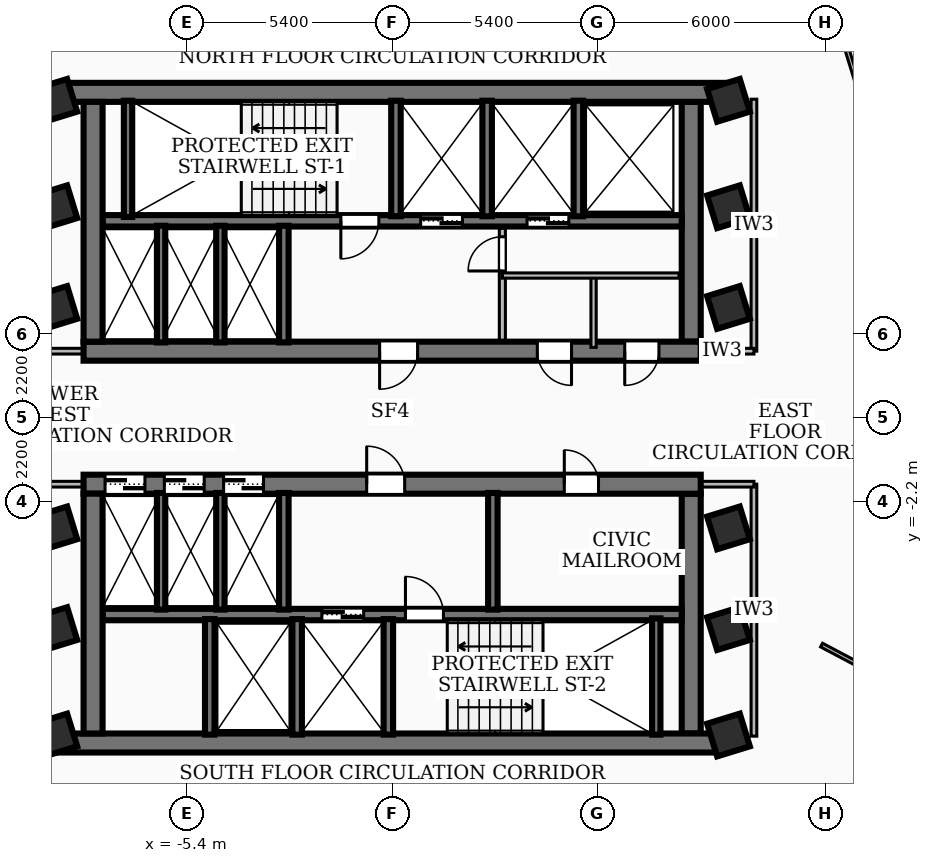
"""IFC4 building model, lengths in metres.
Left out: names, types, materials, properties, quantities, classifications, styles, units other than length and angle.
Written with IfcOpenShell. Run it as: python <this file> out.ifc"""

import sys

from ifc_helpers import new_model, si_unit, direction, frame, frame_2d, origin, origin_2d, place, context, subcontext, project, spatial, rectangle, extrude, element, fill, save


model = new_model("IFC4")
c1 = context("Model", 3, precision=1e-05, world=origin(), true_north=direction((0.0, 1.0)))
c2 = subcontext(c1, "Body", "Model", "MODEL_VIEW")
j1 = project(units=[si_unit("LENGTHUNIT", "METRE"), si_unit("PLANEANGLEUNIT", "RADIAN")], contexts=[c1])
p1 = place(None, origin())
s1 = spatial("IfcSite", under=j1, at=p1, CompositionType="ELEMENT")
p2 = place(p1, origin())
s2 = spatial("IfcBuilding", under=s1, at=p2, CompositionType="ELEMENT")
p3 = place(p2, frame((0.0, 0.0, 148.68)))
s3 = spatial("IfcBuildingStorey", under=s2, at=p3, CompositionType="ELEMENT", Elevation=148.68)
p4 = place(p3, frame((-8.78, 8.56, 0.0), z_axis=(0.0, 0.0, 1.0), x_axis=(1.0, 0.0, 0.0)))
e1 = element("IfcWall", 1, at=p4, inside=s3, PredefinedType="SHEAR", context=c2, shape_type="SweptSolid", body=[
    extrude(rectangle(XDim=17.56, YDim=0.5, at=frame_2d((8.78, 0.0))), origin(), (0.0, 0.0, 1.0), 3.32),
])
p5 = place(p3, frame((8.12, 1.75, 0.0), z_axis=(0.0, 0.0, 1.0), x_axis=(-1.0, 0.0, 0.0)))
e2 = element("IfcWall", 2, at=p5, inside=s3, PredefinedType="SHEAR", context=c2, shape_type="SweptSolid", body=[
    extrude(rectangle(XDim=16.24, YDim=0.5, at=frame_2d((8.12, 0.0))), origin(), (0.0, 0.0, 1.0), 3.32),
])
p6 = place(p5, frame((7.45, 0.0, 0.0)))
e3 = element("IfcOpeningElement", 3, at=p6, cuts=e2, PredefinedType="OPENING", context=c2, shape_type="SweptSolid", body=[
    extrude(rectangle(XDim=1.0, YDim=2.1, at=frame_2d((0.5, 1.05))), frame((0.0, 0.26, 0.0), z_axis=(0.0, -1.0, 0.0), x_axis=(1.0, 0.0, 0.0)), (0.0, 0.0, 1.0), 0.52),
])
p7 = place(p5, frame((3.4, 0.0, 0.0)))
e4 = element("IfcOpeningElement", 4, at=p7, cuts=e2, PredefinedType="OPENING", context=c2, shape_type="SweptSolid", body=[
    extrude(rectangle(XDim=0.9, YDim=2.06, at=frame_2d((0.45, 1.03))), frame((0.0, 0.26, 0.0), z_axis=(0.0, -1.0, 0.0), x_axis=(1.0, 0.0, 0.0)), (0.0, 0.0, 1.0), 0.52),
])
p8 = place(p5, frame((1.1, 0.0, 0.0)))
e5 = element("IfcOpeningElement", 5, at=p8, cuts=e2, PredefinedType="OPENING", context=c2, shape_type="SweptSolid", body=[
    extrude(rectangle(XDim=0.9, YDim=2.06, at=frame_2d((0.45, 1.03))), frame((0.0, 0.26, 0.0), z_axis=(0.0, -1.0, 0.0), x_axis=(1.0, 0.0, 0.0)), (0.0, 0.0, 1.0), 0.52),
])
for number, where, z_axis, x_axis in (
    (6, (-7.87, 2.0, 0.0), (0.0, 0.0, 1.0), (0.0, 1.0, 0.0)),
    (7, (7.87, 8.31, 0.0), (0.0, 0.0, 1.0), (0.0, -1.0, 0.0)),
):
    element("IfcWall", number, at=place(p3, frame(where, z_axis=z_axis, x_axis=x_axis)), inside=s3, PredefinedType="SHEAR", context=c2, shape_type="SweptSolid", body=[
        extrude(rectangle(XDim=6.31, YDim=0.5, at=frame_2d((3.155, 0.0))), origin(), (0.0, 0.0, 1.0), 3.32),
    ])
p9 = place(p3, frame((7.62, 5.18, 0.0), z_axis=(0.0, 0.0, 1.0), x_axis=(-1.0, 0.0, 0.0)))
e8 = element("IfcWall", 8, at=p9, inside=s3, PredefinedType="SOLIDWALL", context=c2, shape_type="SweptSolid", body=[
    extrude(rectangle(XDim=15.24, YDim=0.3, at=frame_2d((7.62, 0.0))), origin(), (0.0, 0.0, 1.0), 3.32),
])
p10 = place(p9, frame((5.77, 0.0, 0.0)))
e9 = element("IfcOpeningElement", 9, at=p10, cuts=e8, PredefinedType="OPENING", context=c2, shape_type="SweptSolid", body=[
    extrude(rectangle(XDim=1.1, YDim=2.15, at=frame_2d((0.55, 1.075))), frame((0.0, 0.16, 0.0), z_axis=(0.0, -1.0, 0.0), x_axis=(1.0, 0.0, 0.0)), (0.0, 0.0, 1.0), 0.32),
])
p11 = place(p9, frame((2.97, 0.0, 0.0)))
e10 = element("IfcOpeningElement", 10, at=p11, cuts=e8, PredefinedType="OPENING", context=c2, shape_type="SweptSolid", body=[
    extrude(rectangle(XDim=1.1, YDim=2.15, at=frame_2d((0.55, 1.075))), frame((0.0, 0.16, 0.0), z_axis=(0.0, -1.0, 0.0), x_axis=(1.0, 0.0, 0.0)), (0.0, 0.0, 1.0), 0.32),
])
p12 = place(p9, frame((7.97, 0.0, 0.0)))
e11 = element("IfcOpeningElement", 11, at=p12, cuts=e8, PredefinedType="OPENING", context=c2, shape_type="SweptSolid", body=[
    extrude(rectangle(XDim=1.0, YDim=2.1, at=frame_2d((0.5, 1.05))), frame((0.0, 0.16, 0.0), z_axis=(0.0, -1.0, 0.0), x_axis=(1.0, 0.0, 0.0)), (0.0, 0.0, 1.0), 0.32),
])
p13 = place(p3, frame((8.78, -8.56, 0.0), z_axis=(0.0, 0.0, 1.0), x_axis=(-1.0, 0.0, 0.0)))
e12 = element("IfcWall", 12, at=p13, inside=s3, PredefinedType="SHEAR", context=c2, shape_type="SweptSolid", body=[
    extrude(rectangle(XDim=17.56, YDim=0.5, at=frame_2d((8.78, 0.0))), origin(), (0.0, 0.0, 1.0), 3.32),
])
p14 = place(p3, frame((-8.12, -1.75, 0.0), z_axis=(0.0, 0.0, 1.0), x_axis=(1.0, 0.0, 0.0)))
e13 = element("IfcWall", 13, at=p14, inside=s3, PredefinedType="SHEAR", context=c2, shape_type="SweptSolid", body=[
    extrude(rectangle(XDim=16.24, YDim=0.5, at=frame_2d((8.12, 0.0))), origin(), (0.0, 0.0, 1.0), 3.32),
])
p15 = place(p14, frame((7.45, 0.0, 0.0)))
e14 = element("IfcOpeningElement", 14, at=p15, cuts=e13, PredefinedType="OPENING", context=c2, shape_type="SweptSolid", body=[
    extrude(rectangle(XDim=1.0, YDim=2.1, at=frame_2d((0.5, 1.05))), frame((0.0, 0.26, 0.0), z_axis=(0.0, -1.0, 0.0), x_axis=(1.0, 0.0, 0.0)), (0.0, 0.0, 1.0), 0.52),
])
p16 = place(p14, frame((12.65, 0.0, 0.0)))
e15 = element("IfcOpeningElement", 15, at=p16, cuts=e13, PredefinedType="OPENING", context=c2, shape_type="SweptSolid", body=[
    extrude(rectangle(XDim=0.9, YDim=2.06, at=frame_2d((0.45, 1.03))), frame((0.0, 0.26, 0.0), z_axis=(0.0, -1.0, 0.0), x_axis=(1.0, 0.0, 0.0)), (0.0, 0.0, 1.0), 0.52),
])
p17 = place(p14, frame((0.565, 0.0, 0.0)))
e16 = element("IfcOpeningElement", 16, at=p17, cuts=e13, PredefinedType="OPENING", context=c2, shape_type="SweptSolid", body=[
    extrude(rectangle(XDim=1.05, YDim=2.15, at=frame_2d((0.525, 1.075))), frame((0.0, 0.26, 0.0), z_axis=(0.0, -1.0, 0.0), x_axis=(1.0, 0.0, 0.0)), (0.0, 0.0, 1.0), 0.52),
])
p18 = place(p14, frame((2.125, 0.0, 0.0)))
e17 = element("IfcOpeningElement", 17, at=p18, cuts=e13, PredefinedType="OPENING", context=c2, shape_type="SweptSolid", body=[
    extrude(rectangle(XDim=1.05, YDim=2.15, at=frame_2d((0.525, 1.075))), frame((0.0, 0.26, 0.0), z_axis=(0.0, -1.0, 0.0), x_axis=(1.0, 0.0, 0.0)), (0.0, 0.0, 1.0), 0.52),
])
p19 = place(p14, frame((3.685, 0.0, 0.0)))
e18 = element("IfcOpeningElement", 18, at=p19, cuts=e13, PredefinedType="OPENING", context=c2, shape_type="SweptSolid", body=[
    extrude(rectangle(XDim=1.05, YDim=2.15, at=frame_2d((0.525, 1.075))), frame((0.0, 0.26, 0.0), z_axis=(0.0, -1.0, 0.0), x_axis=(1.0, 0.0, 0.0)), (0.0, 0.0, 1.0), 0.52),
])
for number, where, z_axis, x_axis in (
    (19, (-7.87, -8.31, 0.0), (0.0, 0.0, 1.0), (0.0, 1.0, 0.0)),
    (20, (7.87, -2.0, 0.0), (0.0, 0.0, 1.0), (0.0, -1.0, 0.0)),
):
    element("IfcWall", number, at=place(p3, frame(where, z_axis=z_axis, x_axis=x_axis)), inside=s3, PredefinedType="SHEAR", context=c2, shape_type="SweptSolid", body=[
        extrude(rectangle(XDim=6.31, YDim=0.5, at=frame_2d((3.155, 0.0))), origin(), (0.0, 0.0, 1.0), 3.32),
    ])
p20 = place(p3, frame((-7.62, -5.18, 0.0), z_axis=(0.0, 0.0, 1.0), x_axis=(1.0, 0.0, 0.0)))
e21 = element("IfcWall", 21, at=p20, inside=s3, PredefinedType="SOLIDWALL", context=c2, shape_type="SweptSolid", body=[
    extrude(rectangle(XDim=15.24, YDim=0.3, at=frame_2d((7.62, 0.0))), origin(), (0.0, 0.0, 1.0), 3.32),
])
p21 = place(p20, frame((5.77, 0.0, 0.0)))
e22 = element("IfcOpeningElement", 22, at=p21, cuts=e21, PredefinedType="OPENING", context=c2, shape_type="SweptSolid", body=[
    extrude(rectangle(XDim=1.1, YDim=2.15, at=frame_2d((0.55, 1.075))), frame((0.0, 0.16, 0.0), z_axis=(0.0, -1.0, 0.0), x_axis=(1.0, 0.0, 0.0)), (0.0, 0.0, 1.0), 0.32),
])
p22 = place(p20, frame((7.97, 0.0, 0.0)))
e23 = element("IfcOpeningElement", 23, at=p22, cuts=e21, PredefinedType="OPENING", context=c2, shape_type="SweptSolid", body=[
    extrude(rectangle(XDim=1.0, YDim=2.1, at=frame_2d((0.5, 1.05))), frame((0.0, 0.16, 0.0), z_axis=(0.0, -1.0, 0.0), x_axis=(1.0, 0.0, 0.0)), (0.0, 0.0, 1.0), 0.32),
])
for number, where, z_axis, x_axis in (
    (24, (-6.95, 5.28, 0.0), (0.0, 0.0, 1.0), (0.0, 1.0, 0.0)),
    (25, (6.95, -8.34, 0.0), (0.0, 0.0, 1.0), (0.0, 1.0, 0.0)),
):
    element("IfcWall", number, at=place(p3, frame(where, z_axis=z_axis, x_axis=x_axis)), inside=s3, PredefinedType="SOLIDWALL", context=c2, shape_type="SweptSolid", body=[
        extrude(rectangle(XDim=3.06, YDim=0.22, at=frame_2d((1.53, 0.0))), origin(), (0.0, 0.0, 1.0), 3.32),
    ])
for number, where, z_axis, x_axis in (
    (26, (0.1, 5.3, 0.0), (0.0, 0.0, 1.0), (0.0, 1.0, 0.0)),
    (27, (2.5, 5.3, 0.0), (0.0, 0.0, 1.0), (0.0, 1.0, 0.0)),
    (28, (4.9, 5.3, 0.0), (0.0, 0.0, 1.0), (0.0, 1.0, 0.0)),
):
    element("IfcWall", number, at=place(p3, frame(where, z_axis=z_axis, x_axis=x_axis)), inside=s3, PredefinedType="SOLIDWALL", context=c2, shape_type="SweptSolid", body=[
        extrude(rectangle(XDim=3.04, YDim=0.25, at=frame_2d((1.52, 0.0))), origin(), (0.0, 0.0, 1.0), 3.32),
    ])
p23 = place(p3, frame((-2.85, 1.98, 0.0), z_axis=(0.0, 0.0, 1.0), x_axis=(0.0, 1.0, 0.0)))
e29 = element("IfcWall", 29, at=p23, inside=s3, PredefinedType="SOLIDWALL", context=c2, shape_type="SweptSolid", body=[
    extrude(rectangle(XDim=3.07, YDim=0.25, at=frame_2d((1.535, 0.0))), origin(), (0.0, 0.0, 1.0), 3.32),
])
for number, where, z_axis, x_axis in (
    (30, (-0.1, -8.34, 0.0), (0.0, 0.0, 1.0), (0.0, 1.0, 0.0)),
    (31, (-2.5, -8.34, 0.0), (0.0, 0.0, 1.0), (0.0, 1.0, 0.0)),
    (32, (-4.8, -8.34, 0.0), (0.0, 0.0, 1.0), (0.0, 1.0, 0.0)),
):
    element("IfcWall", number, at=place(p3, frame(where, z_axis=z_axis, x_axis=x_axis)), inside=s3, PredefinedType="SOLIDWALL", context=c2, shape_type="SweptSolid", body=[
        extrude(rectangle(XDim=3.04, YDim=0.25, at=frame_2d((1.52, 0.0))), origin(), (0.0, 0.0, 1.0), 3.32),
    ])
for number, where, z_axis, x_axis in (
    (33, (-2.85, -5.05, 0.0), (0.0, 0.0, 1.0), (0.0, 1.0, 0.0)),
    (34, (2.65, -5.05, 0.0), (0.0, 0.0, 1.0), (0.0, 1.0, 0.0)),
):
    element("IfcWall", number, at=place(p3, frame(where, z_axis=z_axis, x_axis=x_axis)), inside=s3, PredefinedType="SOLIDWALL", context=c2, shape_type="SweptSolid", body=[
        extrude(rectangle(XDim=3.07, YDim=0.25, at=frame_2d((1.535, 0.0))), origin(), (0.0, 0.0, 1.0), 3.32),
    ])
for number, where, z_axis, x_axis in (
    (35, (-6.08, 1.98, 0.0), (0.0, 0.0, 1.0), (0.0, 1.0, 0.0)),
    (36, (-4.52, 1.98, 0.0), (0.0, 0.0, 1.0), (0.0, 1.0, 0.0)),
    (37, (-6.08, -5.05, 0.0), (0.0, 0.0, 1.0), (0.0, 1.0, 0.0)),
    (38, (-4.52, -5.05, 0.0), (0.0, 0.0, 1.0), (0.0, 1.0, 0.0)),
):
    element("IfcWall", number, at=place(p3, frame(where, z_axis=z_axis, x_axis=x_axis)), inside=s3, PredefinedType="SOLIDWALL", context=c2, shape_type="SweptSolid", body=[
        extrude(rectangle(XDim=3.07, YDim=0.22, at=frame_2d((1.535, 0.0))), origin(), (0.0, 0.0, 1.0), 3.32),
    ])
for number, where, z_axis, x_axis in (
    (39, (-8.85, -5.55, 0.0), (0.0, 0.0, 1.0), (0.956, 0.294, 0.0)),
    (40, (-8.85, -2.9, 0.0), (0.0, 0.0, 1.0), (0.956, 0.294, 0.0)),
    (41, (-8.85, 2.9, 0.0), (0.0, 0.0, 1.0), (0.956, 0.294, 0.0)),
    (42, (-8.85, 5.55, 0.0), (0.0, 0.0, 1.0), (0.956, 0.294, 0.0)),
    (43, (8.85, -5.55, 0.0), (0.0, 0.0, 1.0), (0.956, 0.294, 0.0)),
    (44, (8.85, -2.9, 0.0), (0.0, 0.0, 1.0), (0.956, 0.294, 0.0)),
    (45, (8.85, 2.9, 0.0), (0.0, 0.0, 1.0), (0.956, 0.294, 0.0)),
    (46, (8.85, 5.55, 0.0), (0.0, 0.0, 1.0), (0.956, 0.294, 0.0)),
    (47, (-8.85, 8.35, 0.0), (0.0, 0.0, 1.0), (0.956, 0.294, 0.0)),
    (48, (8.85, -8.35, 0.0), (0.0, 0.0, 1.0), (0.956, 0.294, 0.0)),
    (49, (8.85, 8.35, 0.0), (0.0, 0.0, 1.0), (0.956, 0.294, 0.0)),
    (50, (-8.85, -8.35, 0.0), (0.0, 0.0, 1.0), (0.956, 0.294, 0.0)),
):
    element("IfcColumn", number, at=place(p3, frame(where, z_axis=z_axis, x_axis=x_axis)), inside=s3, PredefinedType="COLUMN", context=c2, shape_type="SweptSolid", body=[
        extrude(rectangle(XDim=0.9, YDim=0.9, at=origin_2d()), origin(), (0.0, 0.0, 1.0), 3.6),
    ])
p24 = place(p3, frame((2.9, 2.04, 0.0), z_axis=(0.0, 0.0, 1.0), x_axis=(0.0, 1.0, 0.0)))
e51 = element("IfcWall", 51, at=p24, inside=s3, PredefinedType="PARTITIONING", context=c2, shape_type="SweptSolid", body=[
    extrude(rectangle(XDim=2.94, YDim=0.16, at=frame_2d((1.47, 0.0))), origin(), (0.0, 0.0, 1.0), 2.55),
])
p25 = place(p24, frame((1.82, 0.0, 0.0)))
e52 = element("IfcOpeningElement", 52, at=p25, cuts=e51, PredefinedType="OPENING", context=c2, shape_type="SweptSolid", body=[
    extrude(rectangle(XDim=0.9, YDim=2.06, at=frame_2d((0.45, 1.03))), frame((0.0, 0.09, 0.0), z_axis=(0.0, -1.0, 0.0), x_axis=(1.0, 0.0, 0.0)), (0.0, 0.0, 1.0), 0.18),
])
p26 = place(p3, frame((2.9, 3.74, 0.0), z_axis=(0.0, 0.0, 1.0), x_axis=(1.0, 0.0, 0.0)))
e53 = element("IfcWall", 53, at=p26, inside=s3, PredefinedType="PARTITIONING", context=c2, shape_type="SweptSolid", body=[
    extrude(rectangle(XDim=4.65, YDim=0.138, at=frame_2d((2.325, 0.0))), origin(), (0.0, 0.0, 1.0), 3.32),
])
p27 = place(p3, frame((5.3, 1.85, 0.0), z_axis=(0.0, 0.0, 1.0), x_axis=(0.0, 1.0, 0.0)))
e54 = element("IfcWall", 54, at=p27, inside=s3, PredefinedType="PARTITIONING", context=c2, shape_type="SweptSolid", body=[
    extrude(rectangle(XDim=1.89, YDim=0.138, at=frame_2d((0.945, 0.0))), origin(), (0.0, 0.0, 1.0), 2.55),
])
for number, where, z_axis, x_axis in (
    (55, (-7.85, 1.75, 0.0), (0.0, 0.0, 1.0), (-1.0, 0.0, 0.0)),
    (56, (-7.85, -1.75, 0.0), (0.0, 0.0, 1.0), (-1.0, 0.0, 0.0)),
):
    element("IfcWall", number, at=place(p3, frame(where, z_axis=z_axis, x_axis=x_axis)), inside=s3, PredefinedType="PARTITIONING", context=c2, shape_type="SweptSolid", body=[
        extrude(rectangle(XDim=1.67, YDim=0.15, at=frame_2d((0.835, 0.0))), origin(), (0.0, 0.0, 1.0), 2.55),
    ])
p28 = place(p3, frame((9.52, 1.75, 0.0), z_axis=(0.0, 0.0, 1.0), x_axis=(0.0, 1.0, 0.0)))
e57 = element("IfcWall", 57, at=p28, inside=s3, PredefinedType="PARTITIONING", context=c2, shape_type="SweptSolid", body=[
    extrude(rectangle(XDim=6.63, YDim=0.15, at=frame_2d((3.315, 0.0))), origin(), (0.0, 0.0, 1.0), 2.55),
])
p29 = place(p3, frame((7.85, 1.75, 0.0), z_axis=(0.0, 0.0, 1.0), x_axis=(1.0, 0.0, 0.0)))
e58 = element("IfcWall", 58, at=p29, inside=s3, PredefinedType="PARTITIONING", context=c2, shape_type="SweptSolid", body=[
    extrude(rectangle(XDim=1.67, YDim=0.15, at=frame_2d((0.835, 0.0))), origin(), (0.0, 0.0, 1.0), 2.55),
])
p30 = place(p3, frame((9.52, -8.38, 0.0), z_axis=(0.0, 0.0, 1.0), x_axis=(0.0, 1.0, 0.0)))
e59 = element("IfcWall", 59, at=p30, inside=s3, PredefinedType="PARTITIONING", context=c2, shape_type="SweptSolid", body=[
    extrude(rectangle(XDim=6.63, YDim=0.15, at=frame_2d((3.315, 0.0))), origin(), (0.0, 0.0, 1.0), 2.55),
])
p31 = place(p3, frame((7.85, -1.75, 0.0), z_axis=(0.0, 0.0, 1.0), x_axis=(1.0, 0.0, 0.0)))
e60 = element("IfcWall", 60, at=p31, inside=s3, PredefinedType="PARTITIONING", context=c2, shape_type="SweptSolid", body=[
    extrude(rectangle(XDim=1.67, YDim=0.15, at=frame_2d((0.835, 0.0))), origin(), (0.0, 0.0, 1.0), 2.55),
])
p32 = place(p3, frame((11.3, -5.983, 0.0), z_axis=(0.0, 0.0, 1.0), x_axis=(0.883779295194, -0.467904004457, 0.0)))
e61 = element("IfcWall", 61, at=p32, inside=s3, PredefinedType="PARTITIONING", context=c2, shape_type="SweptSolid", body=[
    extrude(rectangle(XDim=6.888, YDim=0.11, at=frame_2d((3.444, 0.0))), origin(), (0.0, 0.0, 1.0), 3.32),
])
p33 = place(p3, frame((10.506, 14.447, 0.0), z_axis=(0.0, 0.0, 1.0), x_axis=(0.294033732643, -0.955795042919, 0.0)))
e62 = element("IfcWall", 62, at=p33, inside=s3, PredefinedType="PARTITIONING", context=c2, shape_type="SweptSolid", body=[
    extrude(rectangle(XDim=20.739, YDim=0.11, at=frame_2d((10.369, 0.0))), origin(), (0.0, 0.0, 1.0), 2.55),
])
p34 = place(p33, frame((10.12, 0.0, 0.0)))
e63 = element("IfcOpeningElement", 63, at=p34, cuts=e62, PredefinedType="OPENING", context=c2, shape_type="SweptSolid", body=[
    extrude(rectangle(XDim=1.2, YDim=2.1, at=frame_2d((0.6, 1.05))), frame((0.0, 0.065, 0.0), z_axis=(0.0, -1.0, 0.0), x_axis=(1.0, 0.0, 0.0)), (0.0, 0.0, 1.0), 0.13),
])
p35 = place(p6, origin())
e64 = element("IfcDoor", 64, at=p35, inside=s3, OperationType="SINGLE_SWING_RIGHT", PredefinedType="DOOR", context=c2, shape_type="SweptSolid", body=[
    extrude(rectangle(XDim=1.0, YDim=2.1, at=frame_2d((0.5, 1.05))), frame((0.0, 0.025, 0.0), z_axis=(0.0, -1.0, 0.0), x_axis=(1.0, 0.0, 0.0)), (0.0, 0.0, 1.0), 0.05),
])
fill(e3, e64)
p36 = place(p15, origin())
e65 = element("IfcDoor", 65, at=p36, inside=s3, OperationType="SINGLE_SWING_LEFT", PredefinedType="DOOR", context=c2, shape_type="SweptSolid", body=[
    extrude(rectangle(XDim=1.0, YDim=2.1, at=frame_2d((0.5, 1.05))), frame((0.0, 0.025, 0.0), z_axis=(0.0, -1.0, 0.0), x_axis=(1.0, 0.0, 0.0)), (0.0, 0.0, 1.0), 0.05),
])
fill(e14, e65)
p37 = place(p10, origin())
e66 = element("IfcDoor", 66, at=p37, inside=s3, OperationType="DOUBLE_DOOR_SLIDING", PredefinedType="DOOR", context=c2, shape_type="SweptSolid", body=[
    extrude(rectangle(XDim=1.1, YDim=2.15, at=frame_2d((0.55, 1.075))), frame((0.0, 0.025, 0.0), z_axis=(0.0, -1.0, 0.0), x_axis=(1.0, 0.0, 0.0)), (0.0, 0.0, 1.0), 0.05),
])
fill(e9, e66)
p38 = place(p11, origin())
e67 = element("IfcDoor", 67, at=p38, inside=s3, OperationType="DOUBLE_DOOR_SLIDING", PredefinedType="DOOR", context=c2, shape_type="SweptSolid", body=[
    extrude(rectangle(XDim=1.1, YDim=2.15, at=frame_2d((0.55, 1.075))), frame((0.0, 0.025, 0.0), z_axis=(0.0, -1.0, 0.0), x_axis=(1.0, 0.0, 0.0)), (0.0, 0.0, 1.0), 0.05),
])
fill(e10, e67)
p39 = place(p12, origin())
e68 = element("IfcDoor", 68, at=p39, inside=s3, OperationType="SINGLE_SWING_RIGHT", PredefinedType="DOOR", context=c2, shape_type="SweptSolid", body=[
    extrude(rectangle(XDim=1.0, YDim=2.1, at=frame_2d((0.5, 1.05))), frame((0.0, 0.025, 0.0), z_axis=(0.0, -1.0, 0.0), x_axis=(1.0, 0.0, 0.0)), (0.0, 0.0, 1.0), 0.05),
])
fill(e11, e68)
p40 = place(p21, origin())
e69 = element("IfcDoor", 69, at=p40, inside=s3, OperationType="DOUBLE_DOOR_SLIDING", PredefinedType="DOOR", context=c2, shape_type="SweptSolid", body=[
    extrude(rectangle(XDim=1.1, YDim=2.15, at=frame_2d((0.55, 1.075))), frame((0.0, 0.025, 0.0), z_axis=(0.0, -1.0, 0.0), x_axis=(1.0, 0.0, 0.0)), (0.0, 0.0, 1.0), 0.05),
])
fill(e22, e69)
p41 = place(p22, origin())
e70 = element("IfcDoor", 70, at=p41, inside=s3, OperationType="SINGLE_SWING_LEFT", PredefinedType="DOOR", context=c2, shape_type="SweptSolid", body=[
    extrude(rectangle(XDim=1.0, YDim=2.1, at=frame_2d((0.5, 1.05))), frame((0.0, 0.025, 0.0), z_axis=(0.0, -1.0, 0.0), x_axis=(1.0, 0.0, 0.0)), (0.0, 0.0, 1.0), 0.05),
])
fill(e23, e70)
p42 = place(p16, origin())
e71 = element("IfcDoor", 71, at=p42, inside=s3, OperationType="SINGLE_SWING_LEFT", PredefinedType="DOOR", context=c2, shape_type="SweptSolid", body=[
    extrude(rectangle(XDim=0.9, YDim=2.06, at=frame_2d((0.45, 1.03))), frame((0.0, 0.025, 0.0), z_axis=(0.0, -1.0, 0.0), x_axis=(1.0, 0.0, 0.0)), (0.0, 0.0, 1.0), 0.05),
])
fill(e15, e71)
p43 = place(p17, origin())
e72 = element("IfcDoor", 72, at=p43, inside=s3, OperationType="DOUBLE_DOOR_SLIDING", PredefinedType="DOOR", context=c2, shape_type="SweptSolid", body=[
    extrude(rectangle(XDim=1.05, YDim=2.15, at=frame_2d((0.525, 1.075))), frame((0.0, 0.025, 0.0), z_axis=(0.0, -1.0, 0.0), x_axis=(1.0, 0.0, 0.0)), (0.0, 0.0, 1.0), 0.05),
])
fill(e16, e72)
p44 = place(p18, origin())
e73 = element("IfcDoor", 73, at=p44, inside=s3, OperationType="DOUBLE_DOOR_SLIDING", PredefinedType="DOOR", context=c2, shape_type="SweptSolid", body=[
    extrude(rectangle(XDim=1.05, YDim=2.15, at=frame_2d((0.525, 1.075))), frame((0.0, 0.025, 0.0), z_axis=(0.0, -1.0, 0.0), x_axis=(1.0, 0.0, 0.0)), (0.0, 0.0, 1.0), 0.05),
])
fill(e17, e73)
p45 = place(p19, origin())
e74 = element("IfcDoor", 74, at=p45, inside=s3, OperationType="DOUBLE_DOOR_SLIDING", PredefinedType="DOOR", context=c2, shape_type="SweptSolid", body=[
    extrude(rectangle(XDim=1.05, YDim=2.15, at=frame_2d((0.525, 1.075))), frame((0.0, 0.025, 0.0), z_axis=(0.0, -1.0, 0.0), x_axis=(1.0, 0.0, 0.0)), (0.0, 0.0, 1.0), 0.05),
])
fill(e18, e74)
p46 = place(p7, origin())
e75 = element("IfcDoor", 75, at=p46, inside=s3, OperationType="SINGLE_SWING_LEFT", PredefinedType="DOOR", context=c2, shape_type="SweptSolid", body=[
    extrude(rectangle(XDim=0.9, YDim=2.06, at=frame_2d((0.45, 1.03))), frame((0.0, 0.025, 0.0), z_axis=(0.0, -1.0, 0.0), x_axis=(1.0, 0.0, 0.0)), (0.0, 0.0, 1.0), 0.05),
])
fill(e4, e75)
p47 = place(p8, origin())
e76 = element("IfcDoor", 76, at=p47, inside=s3, OperationType="SINGLE_SWING_RIGHT", PredefinedType="DOOR", context=c2, shape_type="SweptSolid", body=[
    extrude(rectangle(XDim=0.9, YDim=2.06, at=frame_2d((0.45, 1.03))), frame((0.0, 0.025, 0.0), z_axis=(0.0, -1.0, 0.0), x_axis=(1.0, 0.0, 0.0)), (0.0, 0.0, 1.0), 0.05),
])
fill(e5, e76)
p48 = place(p25, origin())
e77 = element("IfcDoor", 77, at=p48, inside=s3, OperationType="SINGLE_SWING_LEFT", PredefinedType="DOOR", context=c2, shape_type="SweptSolid", body=[
    extrude(rectangle(XDim=0.9, YDim=2.06, at=frame_2d((0.45, 1.03))), frame((0.0, 0.025, 0.0), z_axis=(0.0, -1.0, 0.0), x_axis=(1.0, 0.0, 0.0)), (0.0, 0.0, 1.0), 0.05),
])
fill(e52, e77)
save(model, sys.argv[1])
